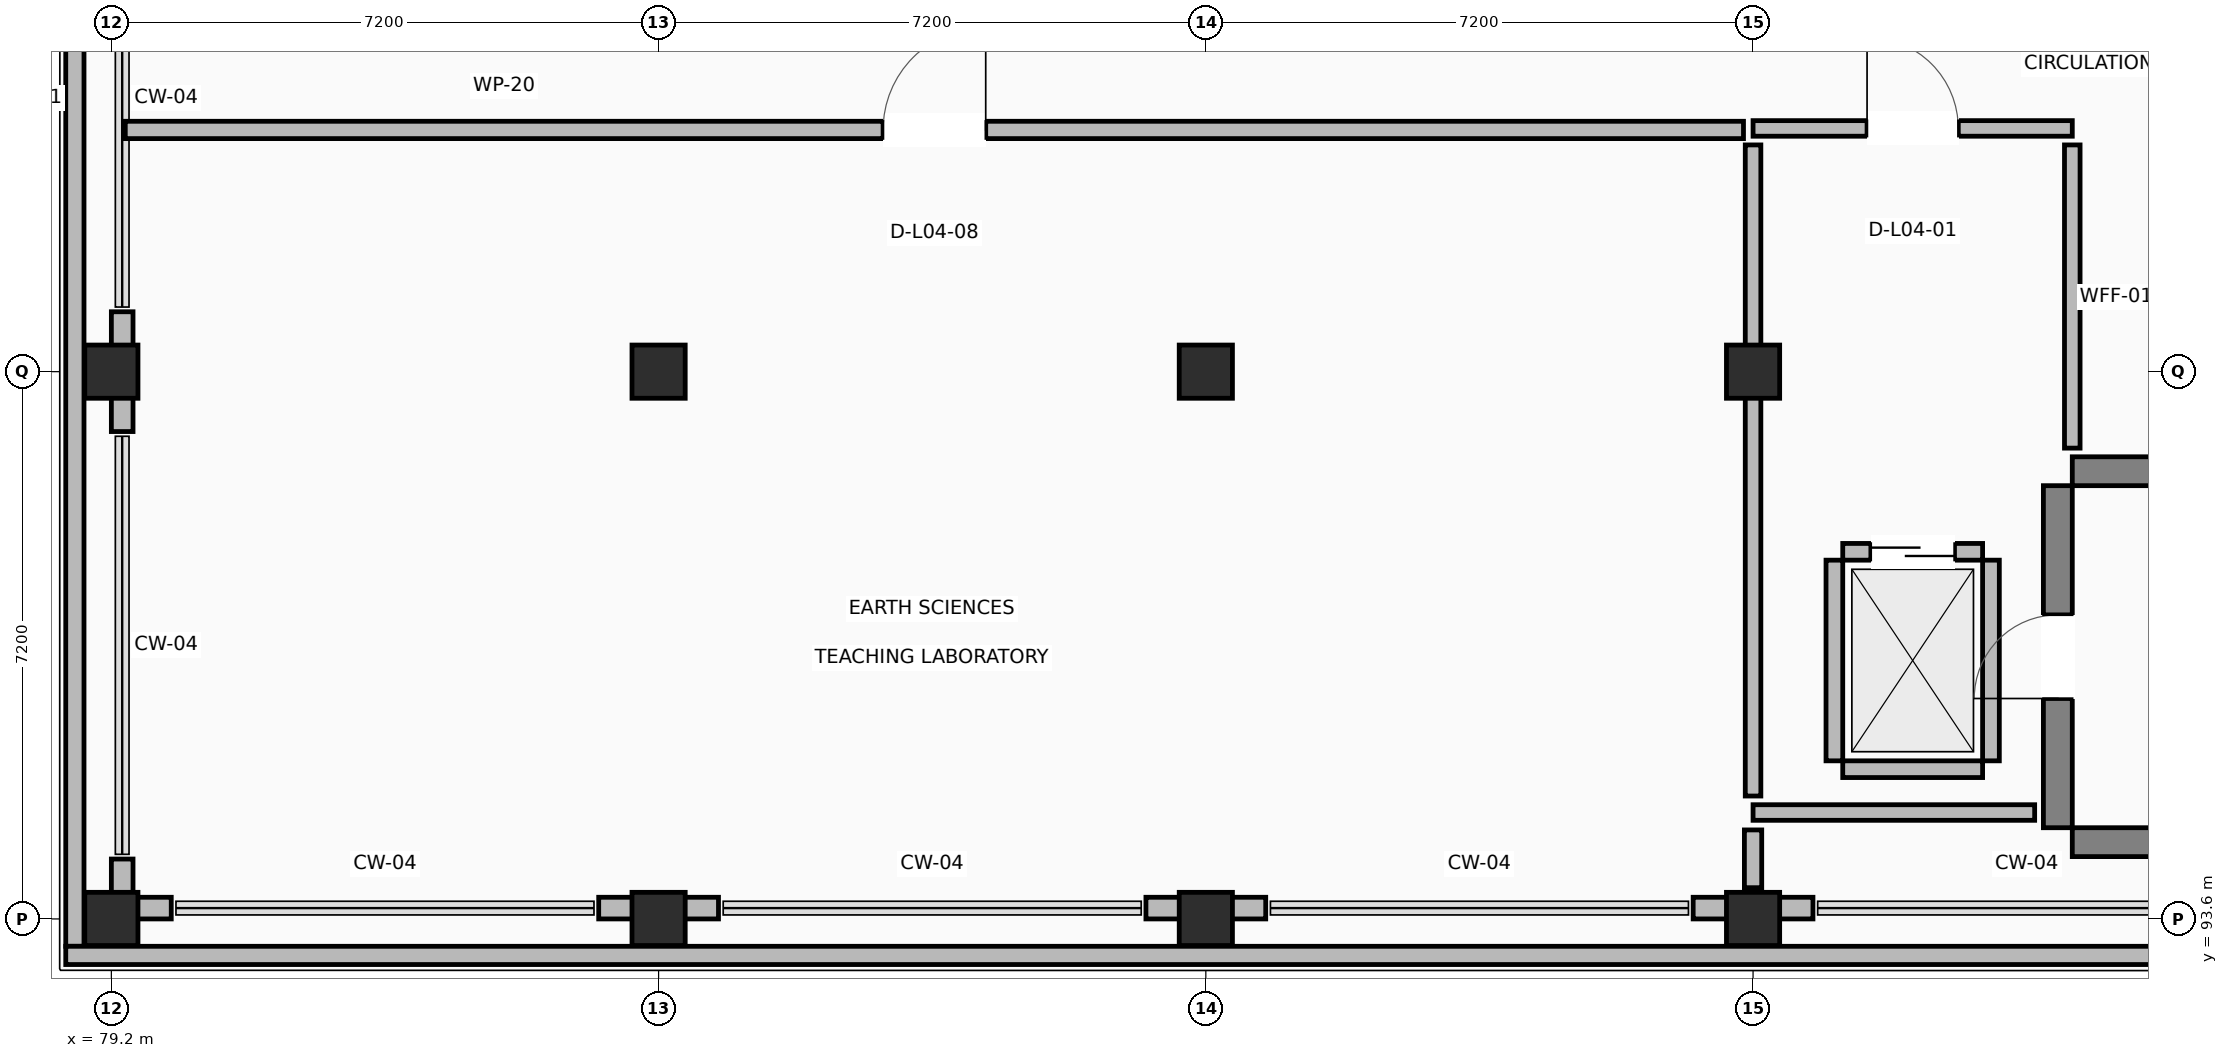
"""IFC4 building model, lengths in metres.
Left out: names, types, materials, properties, quantities, classifications, styles, units other than length and angle.
Written with IfcOpenShell. Run it as: python <this file> out.ifc"""

import sys

from ifc_helpers import new_model, si_unit, direction, frame, frame_2d, origin, origin_2d, place, context, subcontext, project, spatial, rectangle, extrude, element, fill, save


model = new_model("IFC4")
c1 = context("Model", 3, precision=1e-05, world=origin(), true_north=direction((0.0, 1.0)))
c2 = subcontext(c1, "Body", "Model", "MODEL_VIEW")
j1 = project(units=[si_unit("LENGTHUNIT", "METRE"), si_unit("PLANEANGLEUNIT", "RADIAN")], contexts=[c1])
p1 = place(None, origin())
s1 = spatial("IfcSite", under=j1, at=p1, CompositionType="ELEMENT")
p2 = place(p1, origin())
s2 = spatial("IfcBuilding", under=s1, at=p2, CompositionType="ELEMENT")
p3 = place(p2, frame((0.0, 0.0, 18.0)))
s3 = spatial("IfcBuildingStorey", under=s2, at=p3, CompositionType="ELEMENT", Elevation=18.0)
for number, where, z_axis, x_axis in (
    (1, (79.2, 93.6, 0.0), (0.0, 0.0, 1.0), (1.0, 0.0, 0.0)),
    (2, (79.2, 100.8, 0.0), (0.0, 0.0, 1.0), (1.0, 0.0, 0.0)),
    (3, (86.4, 93.6, 0.0), (0.0, 0.0, 1.0), (1.0, 0.0, 0.0)),
    (4, (86.4, 100.8, 0.0), (0.0, 0.0, 1.0), (1.0, 0.0, 0.0)),
    (5, (93.6, 93.6, 0.0), (0.0, 0.0, 1.0), (1.0, 0.0, 0.0)),
    (6, (93.6, 100.8, 0.0), (0.0, 0.0, 1.0), (1.0, 0.0, 0.0)),
    (7, (100.8, 93.6, 0.0), (0.0, 0.0, 1.0), (1.0, 0.0, 0.0)),
    (8, (100.8, 100.8, 0.0), (0.0, 0.0, 1.0), (1.0, 0.0, 0.0)),
):
    element("IfcColumn", number, at=place(p3, frame(where, z_axis=z_axis, x_axis=x_axis)), inside=s3, PredefinedType="COLUMN", context=c2, shape_type="SweptSolid", body=[
        extrude(rectangle(XDim=0.7, YDim=0.7, at=origin_2d()), origin(), (0.0, 0.0, 1.0), 4.22),
    ])
for number, where, z_axis, x_axis in (
    (9, (105.0, 94.61, 0.0), (0.0, 0.0, 1.0), (1.0, 0.0, 0.0)),
    (10, (105.0, 99.49, 0.0), (0.0, 0.0, 1.0), (1.0, 0.0, 0.0)),
):
    element("IfcWall", number, at=place(p3, frame(where, z_axis=z_axis, x_axis=x_axis)), inside=s3, PredefinedType="SHEAR", context=c2, shape_type="SweptSolid", body=[
        extrude(rectangle(XDim=9.5, YDim=0.38, at=frame_2d((4.75, 0.0))), origin(), (0.0, 0.0, 1.0), 4.22),
    ])
p4 = place(p3, frame((104.81, 94.8, 0.0), z_axis=(0.0, 0.0, 1.0), x_axis=(0.0, 1.0, 0.0)))
e11 = element("IfcWall", 11, at=p4, inside=s3, PredefinedType="SHEAR", context=c2, shape_type="SweptSolid", body=[
    extrude(rectangle(XDim=4.5, YDim=0.38, at=frame_2d((2.25, 0.0))), origin(), (0.0, 0.0, 1.0), 4.22),
])
p5 = place(p4, frame((1.7, 0.0, 0.0)))
e12 = element("IfcOpeningElement", 12, at=p5, cuts=e11, PredefinedType="OPENING", context=c2, shape_type="SweptSolid", body=[
    extrude(rectangle(XDim=1.1, YDim=2.15, at=frame_2d((0.55, 1.075))), frame((0.0, 0.2, 0.0), z_axis=(0.0, -1.0, 0.0), x_axis=(1.0, 0.0, 0.0)), (0.0, 0.0, 1.0), 0.4),
])
p6 = place(p3, frame((79.343, 101.588, 0.0), z_axis=(0.0, 0.0, 1.0), x_axis=(0.0, -1.0, 0.0)))
e13 = element("IfcWall", 13, at=p6, inside=s3, PredefinedType="STANDARD", context=c2, shape_type="SweptSolid", body=[
    extrude(rectangle(XDim=1.576, YDim=0.285, at=frame_2d((0.788, 0.0))), origin(), (0.0, 0.0, 1.0), 3.26),
])
p7 = place(p3, frame((79.343, 94.388, 0.0), z_axis=(0.0, 0.0, 1.0), x_axis=(0.0, -1.0, 0.0)))
e14 = element("IfcWall", 14, at=p7, inside=s3, PredefinedType="STANDARD", context=c2, shape_type="SweptSolid", body=[
    extrude(rectangle(XDim=0.503, YDim=0.285, at=frame_2d((0.251, 0.0))), origin(), (0.0, 0.0, 1.0), 3.26),
])
p8 = place(p3, frame((79.2, 93.742, 0.0), z_axis=(0.0, 0.0, 1.0), x_axis=(1.0, 0.0, 0.0)))
e15 = element("IfcWall", 15, at=p8, inside=s3, PredefinedType="STANDARD", context=c2, shape_type="SweptSolid", body=[
    extrude(rectangle(XDim=0.788, YDim=0.285, at=frame_2d((0.394, 0.0))), origin(), (0.0, 0.0, 1.0), 3.26),
])
for number, where, z_axis, x_axis in (
    (16, (85.612, 93.742, 0.0), (0.0, 0.0, 1.0), (1.0, 0.0, 0.0)),
    (17, (92.812, 93.742, 0.0), (0.0, 0.0, 1.0), (1.0, 0.0, 0.0)),
    (18, (100.012, 93.742, 0.0), (0.0, 0.0, 1.0), (1.0, 0.0, 0.0)),
):
    element("IfcWall", number, at=place(p3, frame(where, z_axis=z_axis, x_axis=x_axis)), inside=s3, PredefinedType="STANDARD", context=c2, shape_type="SweptSolid", body=[
        extrude(rectangle(XDim=1.576, YDim=0.285, at=frame_2d((0.788, 0.0))), origin(), (0.0, 0.0, 1.0), 3.26),
    ])
p9 = place(p3, frame((78.72, 93.24, 0.0), z_axis=(0.0, 0.0, 1.0), x_axis=(0.0, 1.0, 0.0)))
e19 = element("IfcWall", 19, at=p9, inside=s3, PredefinedType="PARAPET", context=c2, shape_type="SweptSolid", body=[
    extrude(rectangle(XDim=22.32, YDim=0.24, at=frame_2d((11.16, 0.0))), origin(), (0.0, 0.0, 1.0), 1.12),
])
p10 = place(p3, frame((136.44, 93.12, 0.0), z_axis=(0.0, 0.0, 1.0), x_axis=(-1.0, 0.0, 0.0)))
e20 = element("IfcWall", 20, at=p10, inside=s3, PredefinedType="PARAPET", context=c2, shape_type="SweptSolid", body=[
    extrude(rectangle(XDim=57.84, YDim=0.24, at=frame_2d((28.92, 0.0))), origin(), (0.0, 0.0, 1.0), 1.12),
])
p11 = place(p3, frame((101.98, 95.57, 0.0), z_axis=(0.0, 0.0, 1.0), x_axis=(1.0, 0.0, 0.0)))
e21 = element("IfcWall", 21, at=p11, inside=s3, PredefinedType="STANDARD", context=c2, shape_type="SweptSolid", body=[
    extrude(rectangle(XDim=1.84, YDim=0.22, at=frame_2d((0.92, 0.0))), origin(), (0.0, 0.0, 1.0), 3.26),
])
p12 = place(p3, frame((101.98, 98.43, 0.0), z_axis=(0.0, 0.0, 1.0), x_axis=(1.0, 0.0, 0.0)))
e22 = element("IfcWall", 22, at=p12, inside=s3, PredefinedType="STANDARD", context=c2, shape_type="SweptSolid", body=[
    extrude(rectangle(XDim=1.84, YDim=0.22, at=frame_2d((0.92, 0.0))), origin(), (0.0, 0.0, 1.0), 3.26),
])
p13 = place(p12, frame((0.37, 0.0, 0.0)))
e23 = element("IfcOpeningElement", 23, at=p13, cuts=e22, PredefinedType="OPENING", context=c2, shape_type="SweptSolid", body=[
    extrude(rectangle(XDim=1.1, YDim=2.15, at=frame_2d((0.55, 1.075))), frame((0.0, 0.12, 0.0), z_axis=(0.0, -1.0, 0.0), x_axis=(1.0, 0.0, 0.0)), (0.0, 0.0, 1.0), 0.24),
])
for number, where, z_axis, x_axis in (
    (24, (101.87, 95.68, 0.0), (0.0, 0.0, 1.0), (0.0, 1.0, 0.0)),
    (25, (103.93, 95.68, 0.0), (0.0, 0.0, 1.0), (0.0, 1.0, 0.0)),
):
    element("IfcWall", number, at=place(p3, frame(where, z_axis=z_axis, x_axis=x_axis)), inside=s3, PredefinedType="STANDARD", context=c2, shape_type="SweptSolid", body=[
        extrude(rectangle(XDim=2.64, YDim=0.22, at=frame_2d((1.32, 0.0))), origin(), (0.0, 0.0, 1.0), 3.26),
    ])
p14 = place(p3, frame((100.8, 104.0, 0.0), z_axis=(0.0, 0.0, 1.0), x_axis=(1.0, 0.0, 0.0)))
e26 = element("IfcWall", 26, at=p14, inside=s3, PredefinedType="PARTITIONING", context=c2, shape_type="SweptSolid", body=[
    extrude(rectangle(XDim=4.2, YDim=0.205, at=frame_2d((2.1, 0.0))), origin(), (0.0, 0.0, 1.0), 3.26),
])
p15 = place(p14, frame((1.5, 0.0, 0.0)))
e27 = element("IfcOpeningElement", 27, at=p15, cuts=e26, PredefinedType="OPENING", context=c2, shape_type="SweptSolid", body=[
    extrude(rectangle(XDim=1.2, YDim=2.15, at=frame_2d((0.6, 1.075))), frame((0.0, 0.113, 0.0), z_axis=(0.0, -1.0, 0.0), x_axis=(1.0, 0.0, 0.0)), (0.0, 0.0, 1.0), 0.225),
])
p16 = place(p3, frame((105.0, 103.783, 0.0), z_axis=(0.0, 0.0, 1.0), x_axis=(0.0, -1.0, 0.0)))
e28 = element("IfcWall", 28, at=p16, inside=s3, PredefinedType="PARTITIONING", context=c2, shape_type="SweptSolid", body=[
    extrude(rectangle(XDim=3.989, YDim=0.205, at=frame_2d((1.995, 0.0))), origin(), (0.0, 0.0, 1.0), 3.26),
])
p17 = place(p3, frame((104.505, 95.0, 0.0), z_axis=(0.0, 0.0, 1.0), x_axis=(-1.0, 0.0, 0.0)))
e29 = element("IfcWall", 29, at=p17, inside=s3, PredefinedType="PARTITIONING", context=c2, shape_type="SweptSolid", body=[
    extrude(rectangle(XDim=3.705, YDim=0.205, at=frame_2d((1.853, 0.0))), origin(), (0.0, 0.0, 1.0), 3.26),
])
p18 = place(p3, frame((100.8, 95.217, 0.0), z_axis=(0.0, 0.0, 1.0), x_axis=(0.0, 1.0, 0.0)))
e30 = element("IfcWall", 30, at=p18, inside=s3, PredefinedType="PARTITIONING", context=c2, shape_type="SweptSolid", body=[
    extrude(rectangle(XDim=8.566, YDim=0.205, at=frame_2d((4.283, 0.0))), origin(), (0.0, 0.0, 1.0), 3.26),
])
p19 = place(p3, frame((79.383, 103.98, 0.0), z_axis=(0.0, 0.0, 1.0), x_axis=(1.0, 0.0, 0.0)))
e31 = element("IfcWall", 31, at=p19, inside=s3, PredefinedType="PARTITIONING", context=c2, shape_type="SweptSolid", body=[
    extrude(rectangle(XDim=21.291, YDim=0.228, at=frame_2d((10.646, 0.0))), origin(), (0.0, 0.0, 1.0), 3.26),
])
p20 = place(p19, frame((9.971, 0.0, 0.0)))
e32 = element("IfcOpeningElement", 32, at=p20, cuts=e31, PredefinedType="OPENING", context=c2, shape_type="SweptSolid", body=[
    extrude(rectangle(XDim=1.35, YDim=2.15, at=frame_2d((0.675, 1.075))), frame((0.0, 0.124, 0.0), z_axis=(0.0, -1.0, 0.0), x_axis=(1.0, 0.0, 0.0)), (0.0, 0.0, 1.0), 0.248),
])
p21 = place(p3, frame((100.8, 94.771, 0.0), z_axis=(0.0, 0.0, 1.0), x_axis=(0.0, -1.0, 0.0)))
e33 = element("IfcWall", 33, at=p21, inside=s3, PredefinedType="PARTITIONING", context=c2, shape_type="SweptSolid", body=[
    extrude(rectangle(XDim=0.76, YDim=0.228, at=frame_2d((0.38, 0.0))), origin(), (0.0, 0.0, 1.0), 3.26),
])
p22 = place(p5, origin())
e34 = element("IfcDoor", 34, at=p22, inside=s3, OperationType="SINGLE_SWING_LEFT", PredefinedType="DOOR", context=c2, shape_type="SweptSolid", body=[
    extrude(rectangle(XDim=1.1, YDim=2.15, at=frame_2d((0.55, 1.075))), frame((0.0, 0.025, 0.0), z_axis=(0.0, -1.0, 0.0), x_axis=(1.0, 0.0, 0.0)), (0.0, 0.0, 1.0), 0.05),
])
fill(e12, e34)
p23 = place(p13, origin())
e35 = element("IfcDoor", 35, at=p23, inside=s3, OperationType="SLIDING_TO_LEFT", PredefinedType="DOOR", context=c2, shape_type="SweptSolid", body=[
    extrude(rectangle(XDim=1.1, YDim=2.15, at=frame_2d((0.55, 1.075))), frame((0.0, 0.025, 0.0), z_axis=(0.0, -1.0, 0.0), x_axis=(1.0, 0.0, 0.0)), (0.0, 0.0, 1.0), 0.05),
])
fill(e23, e35)
p24 = place(p15, origin())
e36 = element("IfcDoor", 36, at=p24, inside=s3, OperationType="SINGLE_SWING_LEFT", PredefinedType="DOOR", context=c2, shape_type="SweptSolid", body=[
    extrude(rectangle(XDim=1.2, YDim=2.15, at=frame_2d((0.6, 1.075))), frame((0.0, 0.025, 0.0), z_axis=(0.0, -1.0, 0.0), x_axis=(1.0, 0.0, 0.0)), (0.0, 0.0, 1.0), 0.05),
])
fill(e27, e36)
p25 = place(p20, origin())
e37 = element("IfcDoor", 37, at=p25, inside=s3, OperationType="SINGLE_SWING_RIGHT", PredefinedType="DOOR", context=c2, shape_type="SweptSolid", body=[
    extrude(rectangle(XDim=1.35, YDim=2.15, at=frame_2d((0.675, 1.075))), frame((0.0, 0.025, 0.0), z_axis=(0.0, -1.0, 0.0), x_axis=(1.0, 0.0, 0.0)), (0.0, 0.0, 1.0), 0.05),
])
fill(e32, e37)
save(model, sys.argv[1])
